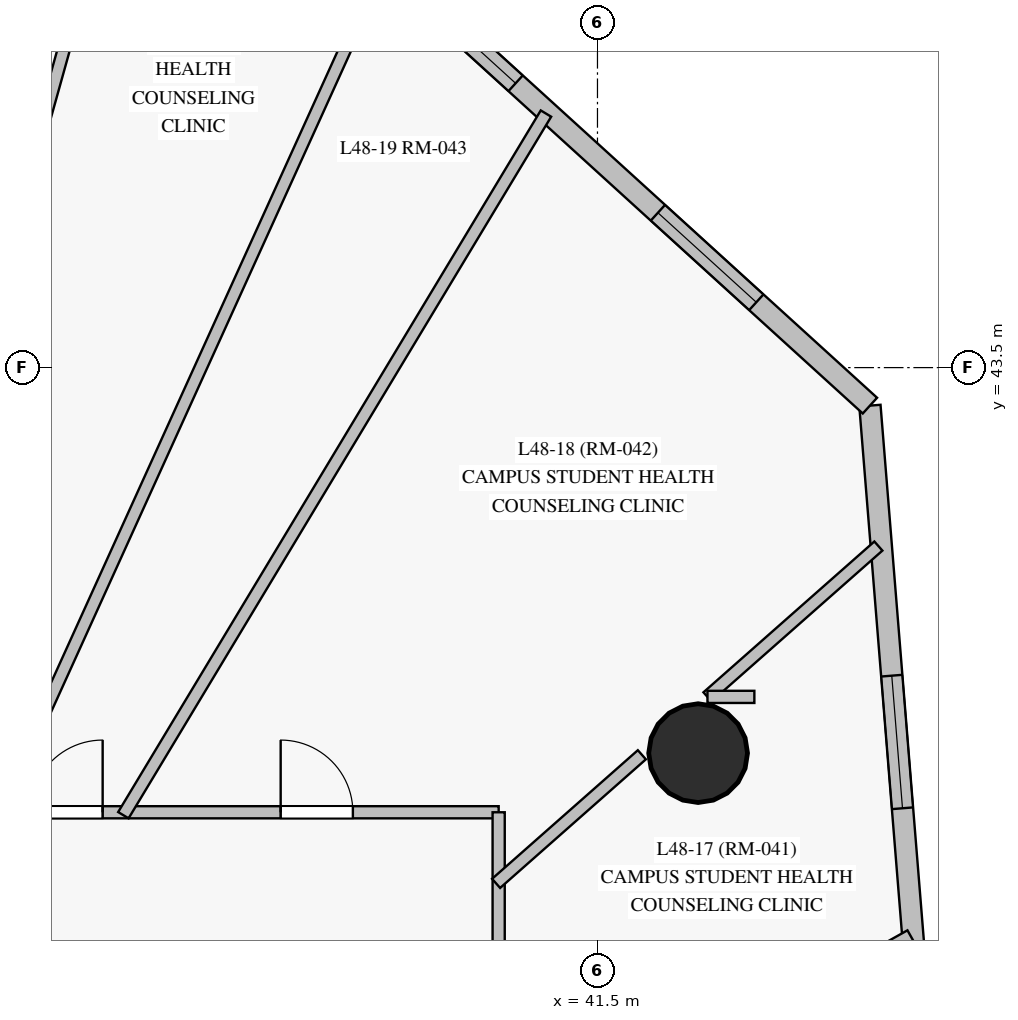
"""IFC4 building model, lengths in metres.
Left out: names, types, materials, properties, quantities, classifications, styles, units other than length and angle.
Written with IfcOpenShell. Run it as: python <this file> out.ifc"""

import sys

from ifc_helpers import new_model, si_unit, direction, frame, frame_2d, origin, origin_with_axes, origin_2d, place, context, subcontext, project, spatial, rectangle, circle, extrude, source, transform, mapped, element, fill, save


model = new_model("IFC4")
c1 = context("Model", 3, precision=1e-05, world=origin(), true_north=direction((0.0, 1.0)))
c2 = subcontext(c1, "Body", "Model", "MODEL_VIEW")
j1 = project(units=[si_unit("LENGTHUNIT", "METRE"), si_unit("PLANEANGLEUNIT", "RADIAN")], contexts=[c1])
p1 = place(None, origin())
s1 = spatial("IfcSite", under=j1, at=p1, CompositionType="ELEMENT")
p2 = place(p1, origin())
s2 = spatial("IfcBuilding", under=s1, at=p2, CompositionType="ELEMENT")
p3 = place(p2, frame((0.0, 0.0, 168.75)))
s3 = spatial("IfcBuildingStorey", under=s2, at=p3, CompositionType="ELEMENT", Elevation=168.75)
m1 = source(origin_with_axes(), c2, "Body", "SweptSolid", [
    extrude(circle(Radius=0.65, at=origin_2d()), origin(), (0.0, 0.0, 1.0), 3.05),
])
p4 = place(p3, frame((42.824, 38.428, 0.0), z_axis=(0.0, 0.0, 1.0), x_axis=(1.0, 0.0, 0.0)))
e1 = element("IfcColumn", 1, at=p4, inside=s3, PredefinedType="COLUMN", context=c2, shape_type="MappedRepresentation", body=[
    mapped(m1, transform((0.0, 0.0, 0.0), scale=1.0)),
])
p5 = place(p3, frame((46.215, 29.022, 0.0), z_axis=(0.0, 0.0, 1.0), x_axis=(-0.080623276525, 0.996744644973, 0.0)))
e2 = element("IfcWall", 2, at=p5, inside=s3, PredefinedType="SOLIDWALL", context=c2, shape_type="SweptSolid", body=[
    extrude(rectangle(XDim=14.023, YDim=0.28, at=frame_2d((7.012, 0.0))), origin(), (0.0, 0.0, 1.0), 2.825),
])
p6 = place(p5, frame((2.867, 0.0, 0.85)))
e3 = element("IfcOpeningElement", 3, at=p6, cuts=e2, PredefinedType="OPENING", context=c2, shape_type="SweptSolid", body=[
    extrude(rectangle(XDim=1.75, YDim=1.65, at=frame_2d((0.875, 0.825))), frame((0.0, 0.15, 0.0), z_axis=(0.0, -1.0, 0.0), x_axis=(1.0, 0.0, 0.0)), (0.0, 0.0, 1.0), 0.3),
])
p7 = place(p5, frame((8.709, 0.0, 0.85)))
e4 = element("IfcOpeningElement", 4, at=p7, cuts=e2, PredefinedType="OPENING", context=c2, shape_type="SweptSolid", body=[
    extrude(rectangle(XDim=1.75, YDim=1.65, at=frame_2d((0.875, 0.825))), frame((0.0, 0.15, 0.0), z_axis=(0.0, -1.0, 0.0), x_axis=(1.0, 0.0, 0.0)), (0.0, 0.0, 1.0), 0.3),
])
p8 = place(p3, frame((45.084, 43.0, 0.0), z_axis=(0.0, 0.0, 1.0), x_axis=(-0.739676368258, 0.672962755463, 0.0)))
e5 = element("IfcWall", 5, at=p8, inside=s3, PredefinedType="SOLIDWALL", context=c2, shape_type="SweptSolid", body=[
    extrude(rectangle(XDim=9.595, YDim=0.28, at=frame_2d((4.798, 0.0))), origin(), (0.0, 0.0, 1.0), 2.825),
])
p9 = place(p8, frame((2.021, 0.0, 0.85)))
e6 = element("IfcOpeningElement", 6, at=p9, cuts=e5, PredefinedType="OPENING", context=c2, shape_type="SweptSolid", body=[
    extrude(rectangle(XDim=1.75, YDim=1.65, at=frame_2d((0.875, 0.825))), frame((0.0, 0.15, 0.0), z_axis=(0.0, -1.0, 0.0), x_axis=(1.0, 0.0, 0.0)), (0.0, 0.0, 1.0), 0.3),
])
p10 = place(p8, frame((6.302, 0.0, 0.85)))
e7 = element("IfcOpeningElement", 7, at=p10, cuts=e5, PredefinedType="OPENING", context=c2, shape_type="SweptSolid", body=[
    extrude(rectangle(XDim=1.75, YDim=1.65, at=frame_2d((0.875, 0.825))), frame((0.0, 0.15, 0.0), z_axis=(0.0, -1.0, 0.0), x_axis=(1.0, 0.0, 0.0)), (0.0, 0.0, 1.0), 0.3),
])
p11 = place(p3, frame((16.7, 37.65, 0.0), z_axis=(0.0, 0.0, 1.0), x_axis=(1.0, 0.0, 0.0)))
e8 = element("IfcWall", 8, at=p11, inside=s3, PredefinedType="PARTITIONING", context=c2, shape_type="SweptSolid", body=[
    extrude(rectangle(XDim=23.5, YDim=0.16, at=frame_2d((11.75, 0.0))), origin(), (0.0, 0.0, 1.0), 2.375),
])
p12 = place(p11, frame((20.632, 0.0, 0.0)))
e9 = element("IfcOpeningElement", 9, at=p12, cuts=e8, PredefinedType="OPENING", context=c2, shape_type="SweptSolid", body=[
    extrude(rectangle(XDim=0.95, YDim=2.15, at=frame_2d((0.475, 1.075))), frame((0.0, 0.09, 0.0), z_axis=(0.0, -1.0, 0.0), x_axis=(1.0, 0.0, 0.0)), (0.0, 0.0, 1.0), 0.18),
])
p13 = place(p11, frame((17.34, 0.0, 0.0)))
e10 = element("IfcOpeningElement", 10, at=p13, cuts=e8, PredefinedType="OPENING", context=c2, shape_type="SweptSolid", body=[
    extrude(rectangle(XDim=0.95, YDim=2.15, at=frame_2d((0.475, 1.075))), frame((0.0, 0.09, 0.0), z_axis=(0.0, -1.0, 0.0), x_axis=(1.0, 0.0, 0.0)), (0.0, 0.0, 1.0), 0.18),
])
p14 = place(p11, frame((15.24, 0.0, 0.0)))
e11 = element("IfcOpeningElement", 11, at=p14, cuts=e8, PredefinedType="OPENING", context=c2, shape_type="SweptSolid", body=[
    extrude(rectangle(XDim=0.95, YDim=2.15, at=frame_2d((0.475, 1.075))), frame((0.0, 0.09, 0.0), z_axis=(0.0, -1.0, 0.0), x_axis=(1.0, 0.0, 0.0)), (0.0, 0.0, 1.0), 0.18),
])
p15 = place(p11, frame((13.482, 0.0, 0.0)))
e12 = element("IfcOpeningElement", 12, at=p15, cuts=e8, PredefinedType="OPENING", context=c2, shape_type="SweptSolid", body=[
    extrude(rectangle(XDim=0.95, YDim=2.15, at=frame_2d((0.475, 1.075))), frame((0.0, 0.09, 0.0), z_axis=(0.0, -1.0, 0.0), x_axis=(1.0, 0.0, 0.0)), (0.0, 0.0, 1.0), 0.18),
])
p16 = place(p11, frame((11.365, 0.0, 0.0)))
e13 = element("IfcOpeningElement", 13, at=p16, cuts=e8, PredefinedType="OPENING", context=c2, shape_type="SweptSolid", body=[
    extrude(rectangle(XDim=0.95, YDim=2.15, at=frame_2d((0.475, 1.075))), frame((0.0, 0.09, 0.0), z_axis=(0.0, -1.0, 0.0), x_axis=(1.0, 0.0, 0.0)), (0.0, 0.0, 1.0), 0.18),
])
p17 = place(p11, frame((9.588, 0.0, 0.0)))
e14 = element("IfcOpeningElement", 14, at=p17, cuts=e8, PredefinedType="OPENING", context=c2, shape_type="SweptSolid", body=[
    extrude(rectangle(XDim=0.95, YDim=2.15, at=frame_2d((0.475, 1.075))), frame((0.0, 0.09, 0.0), z_axis=(0.0, -1.0, 0.0), x_axis=(1.0, 0.0, 0.0)), (0.0, 0.0, 1.0), 0.18),
])
p18 = place(p11, frame((7.75, 0.0, 0.0)))
e15 = element("IfcOpeningElement", 15, at=p18, cuts=e8, PredefinedType="OPENING", context=c2, shape_type="SweptSolid", body=[
    extrude(rectangle(XDim=0.95, YDim=2.15, at=frame_2d((0.475, 1.075))), frame((0.0, 0.09, 0.0), z_axis=(0.0, -1.0, 0.0), x_axis=(1.0, 0.0, 0.0)), (0.0, 0.0, 1.0), 0.18),
])
p19 = place(p11, frame((5.4, 0.0, 0.0)))
e16 = element("IfcOpeningElement", 16, at=p19, cuts=e8, PredefinedType="OPENING", context=c2, shape_type="SweptSolid", body=[
    extrude(rectangle(XDim=0.95, YDim=2.15, at=frame_2d((0.475, 1.075))), frame((0.0, 0.09, 0.0), z_axis=(0.0, -1.0, 0.0), x_axis=(1.0, 0.0, 0.0)), (0.0, 0.0, 1.0), 0.18),
])
p20 = place(p11, frame((1.277, 0.0, 0.0)))
e17 = element("IfcOpeningElement", 17, at=p20, cuts=e8, PredefinedType="OPENING", context=c2, shape_type="SweptSolid", body=[
    extrude(rectangle(XDim=0.86, YDim=2.04, at=frame_2d((0.43, 1.02))), frame((0.0, 0.09, 0.0), z_axis=(0.0, -1.0, 0.0), x_axis=(1.0, 0.0, 0.0)), (0.0, 0.0, 1.0), 0.18),
])
p21 = place(p3, frame((40.2, 37.65, 0.0), z_axis=(0.0, 0.0, 1.0), x_axis=(0.0, -1.0, 0.0)))
e18 = element("IfcWall", 18, at=p21, inside=s3, PredefinedType="PARTITIONING", context=c2, shape_type="SweptSolid", body=[
    extrude(rectangle(XDim=22.3, YDim=0.16, at=frame_2d((11.15, 0.0))), origin(), (0.0, 0.0, 1.0), 2.375),
])
p22 = place(p21, frame((14.02, 0.0, 0.0)))
e19 = element("IfcOpeningElement", 19, at=p22, cuts=e18, PredefinedType="OPENING", context=c2, shape_type="SweptSolid", body=[
    extrude(rectangle(XDim=0.95, YDim=2.15, at=frame_2d((0.475, 1.075))), frame((0.0, 0.09, 0.0), z_axis=(0.0, -1.0, 0.0), x_axis=(1.0, 0.0, 0.0)), (0.0, 0.0, 1.0), 0.18),
])
p23 = place(p21, frame((10.675, 0.0, 0.0)))
e20 = element("IfcOpeningElement", 20, at=p23, cuts=e18, PredefinedType="OPENING", context=c2, shape_type="SweptSolid", body=[
    extrude(rectangle(XDim=0.95, YDim=2.15, at=frame_2d((0.475, 1.075))), frame((0.0, 0.09, 0.0), z_axis=(0.0, -1.0, 0.0), x_axis=(1.0, 0.0, 0.0)), (0.0, 0.0, 1.0), 0.18),
])
p24 = place(p21, frame((7.33, 0.0, 0.0)))
e21 = element("IfcOpeningElement", 21, at=p24, cuts=e18, PredefinedType="OPENING", context=c2, shape_type="SweptSolid", body=[
    extrude(rectangle(XDim=0.95, YDim=2.15, at=frame_2d((0.475, 1.075))), frame((0.0, 0.09, 0.0), z_axis=(0.0, -1.0, 0.0), x_axis=(1.0, 0.0, 0.0)), (0.0, 0.0, 1.0), 0.18),
])
p25 = place(p21, frame((2.181, 0.0, 0.0)))
e22 = element("IfcOpeningElement", 22, at=p25, cuts=e18, PredefinedType="OPENING", context=c2, shape_type="SweptSolid", body=[
    extrude(rectangle(XDim=0.95, YDim=2.15, at=frame_2d((0.475, 1.075))), frame((0.0, 0.09, 0.0), z_axis=(0.0, -1.0, 0.0), x_axis=(1.0, 0.0, 0.0)), (0.0, 0.0, 1.0), 0.18),
])
p26 = place(p3, frame((31.668, 37.621, 0.0), z_axis=(0.0, 0.0, 1.0), x_axis=(0.268958912478, 0.963151651298, 0.0)))
e23 = element("IfcWall", 23, at=p26, inside=s3, PredefinedType="PARTITIONING", context=c2, shape_type="SweptSolid", body=[
    extrude(rectangle(XDim=12.35, YDim=0.16, at=frame_2d((6.175, 0.0))), origin(), (0.0, 0.0, 1.0), 2.825),
])
p27 = place(p3, frame((33.607, 37.609, 0.0), z_axis=(0.0, 0.0, 1.0), x_axis=(0.413209547716, 0.9106359699, 0.0)))
e24 = element("IfcWall", 24, at=p27, inside=s3, PredefinedType="PARTITIONING", context=c2, shape_type="SweptSolid", body=[
    extrude(rectangle(XDim=12.277, YDim=0.16, at=frame_2d((6.139, 0.0))), origin(), (0.0, 0.0, 1.0), 2.825),
])
p28 = place(p3, frame((35.263, 37.612, 0.0), z_axis=(0.0, 0.0, 1.0), x_axis=(0.515947737753, 0.856620062751, 0.0)))
e25 = element("IfcWall", 25, at=p28, inside=s3, PredefinedType="PARTITIONING", context=c2, shape_type="SweptSolid", body=[
    extrude(rectangle(XDim=10.775, YDim=0.16, at=frame_2d((5.388, 0.0))), origin(), (0.0, 0.0, 1.0), 2.825),
])
p29 = place(p3, frame((40.174, 32.976, 0.0), z_axis=(0.0, 0.0, 1.0), x_axis=(0.872285103808, 0.488997645878, 0.0)))
e26 = element("IfcWall", 26, at=p29, inside=s3, PredefinedType="PARTITIONING", context=c2, shape_type="SweptSolid", body=[
    extrude(rectangle(XDim=6.24, YDim=0.16, at=frame_2d((3.12, 0.0))), origin(), (0.0, 0.0, 1.0), 2.825),
])
p30 = place(p3, frame((42.947, 39.168, 0.0), z_axis=(0.0, 0.0, 1.0), x_axis=(0.749811723164, 0.661651252402, 0.0)))
e27 = element("IfcWall", 27, at=p30, inside=s3, PredefinedType="PARTITIONING", context=c2, shape_type="SweptSolid", body=[
    extrude(rectangle(XDim=2.999, YDim=0.16, at=frame_2d((1.5, 0.0))), origin(), (0.0, 0.0, 1.0), 2.825),
])
p31 = place(p3, frame((40.166, 36.714, 0.0), z_axis=(0.0, 0.0, 1.0), x_axis=(0.749832283788, 0.661627951487, 0.0)))
e28 = element("IfcWall", 28, at=p31, inside=s3, PredefinedType="PARTITIONING", context=c2, shape_type="SweptSolid", body=[
    extrude(rectangle(XDim=2.558, YDim=0.16, at=frame_2d((1.279, 0.0))), origin(), (0.0, 0.0, 1.0), 2.275),
])
p32 = place(p3, frame((43.564, 39.168, 0.0), z_axis=(0.0, 0.0, 1.0), x_axis=(-1.0, 0.0, 0.0)))
e29 = element("IfcWall", 29, at=p32, inside=s3, PredefinedType="PARTITIONING", context=c2, shape_type="SweptSolid", body=[
    extrude(rectangle(XDim=0.617, YDim=0.16, at=frame_2d((0.309, 0.0))), origin(), (0.0, 0.0, 1.0), 2.825),
])
m2 = source(origin_with_axes(), c2, "Body", "SweptSolid", [
    extrude(rectangle(XDim=1.75, YDim=1.65, at=frame_2d((0.875, 0.825))), frame((0.0, 0.03, 0.0), z_axis=(0.0, -1.0, 0.0), x_axis=(1.0, 0.0, 0.0)), (0.0, 0.0, 1.0), 0.06),
])
p33 = place(p7, origin())
e30 = element("IfcWindow", 30, at=p33, inside=s3, PartitioningType="SINGLE_PANEL", PredefinedType="WINDOW", context=c2, shape_type="MappedRepresentation", body=[
    mapped(m2, transform((0.0, 0.0, 0.0), scale=1.0)),
])
fill(e4, e30)
p34 = place(p9, origin())
e31 = element("IfcWindow", 31, at=p34, inside=s3, PartitioningType="SINGLE_PANEL", PredefinedType="WINDOW", context=c2, shape_type="MappedRepresentation", body=[
    mapped(m2, transform((0.0, 0.0, 0.0), scale=1.0)),
])
fill(e6, e31)
p35 = place(p10, origin())
e32 = element("IfcWindow", 32, at=p35, inside=s3, PartitioningType="SINGLE_PANEL", PredefinedType="WINDOW", context=c2, shape_type="MappedRepresentation", body=[
    mapped(m2, transform((0.0, 0.0, 0.0), scale=1.0)),
])
fill(e7, e32)
m3 = source(origin_with_axes(), c2, "Body", "SweptSolid", [
    extrude(rectangle(XDim=0.95, YDim=2.15, at=frame_2d((0.475, 1.075))), frame((0.0, 0.025, 0.0), z_axis=(0.0, -1.0, 0.0), x_axis=(1.0, 0.0, 0.0)), (0.0, 0.0, 1.0), 0.05),
])
p36 = place(p12, origin())
e33 = element("IfcDoor", 33, at=p36, inside=s3, OperationType="SINGLE_SWING_LEFT", PredefinedType="DOOR", context=c2, shape_type="MappedRepresentation", body=[
    mapped(m3, transform((0.0, 0.0, 0.0), scale=1.0)),
])
fill(e9, e33)
p37 = place(p13, origin())
e34 = element("IfcDoor", 34, at=p37, inside=s3, OperationType="SINGLE_SWING_RIGHT", PredefinedType="DOOR", context=c2, shape_type="MappedRepresentation", body=[
    mapped(m3, transform((0.0, 0.0, 0.0), scale=1.0)),
])
fill(e10, e34)
save(model, sys.argv[1])
